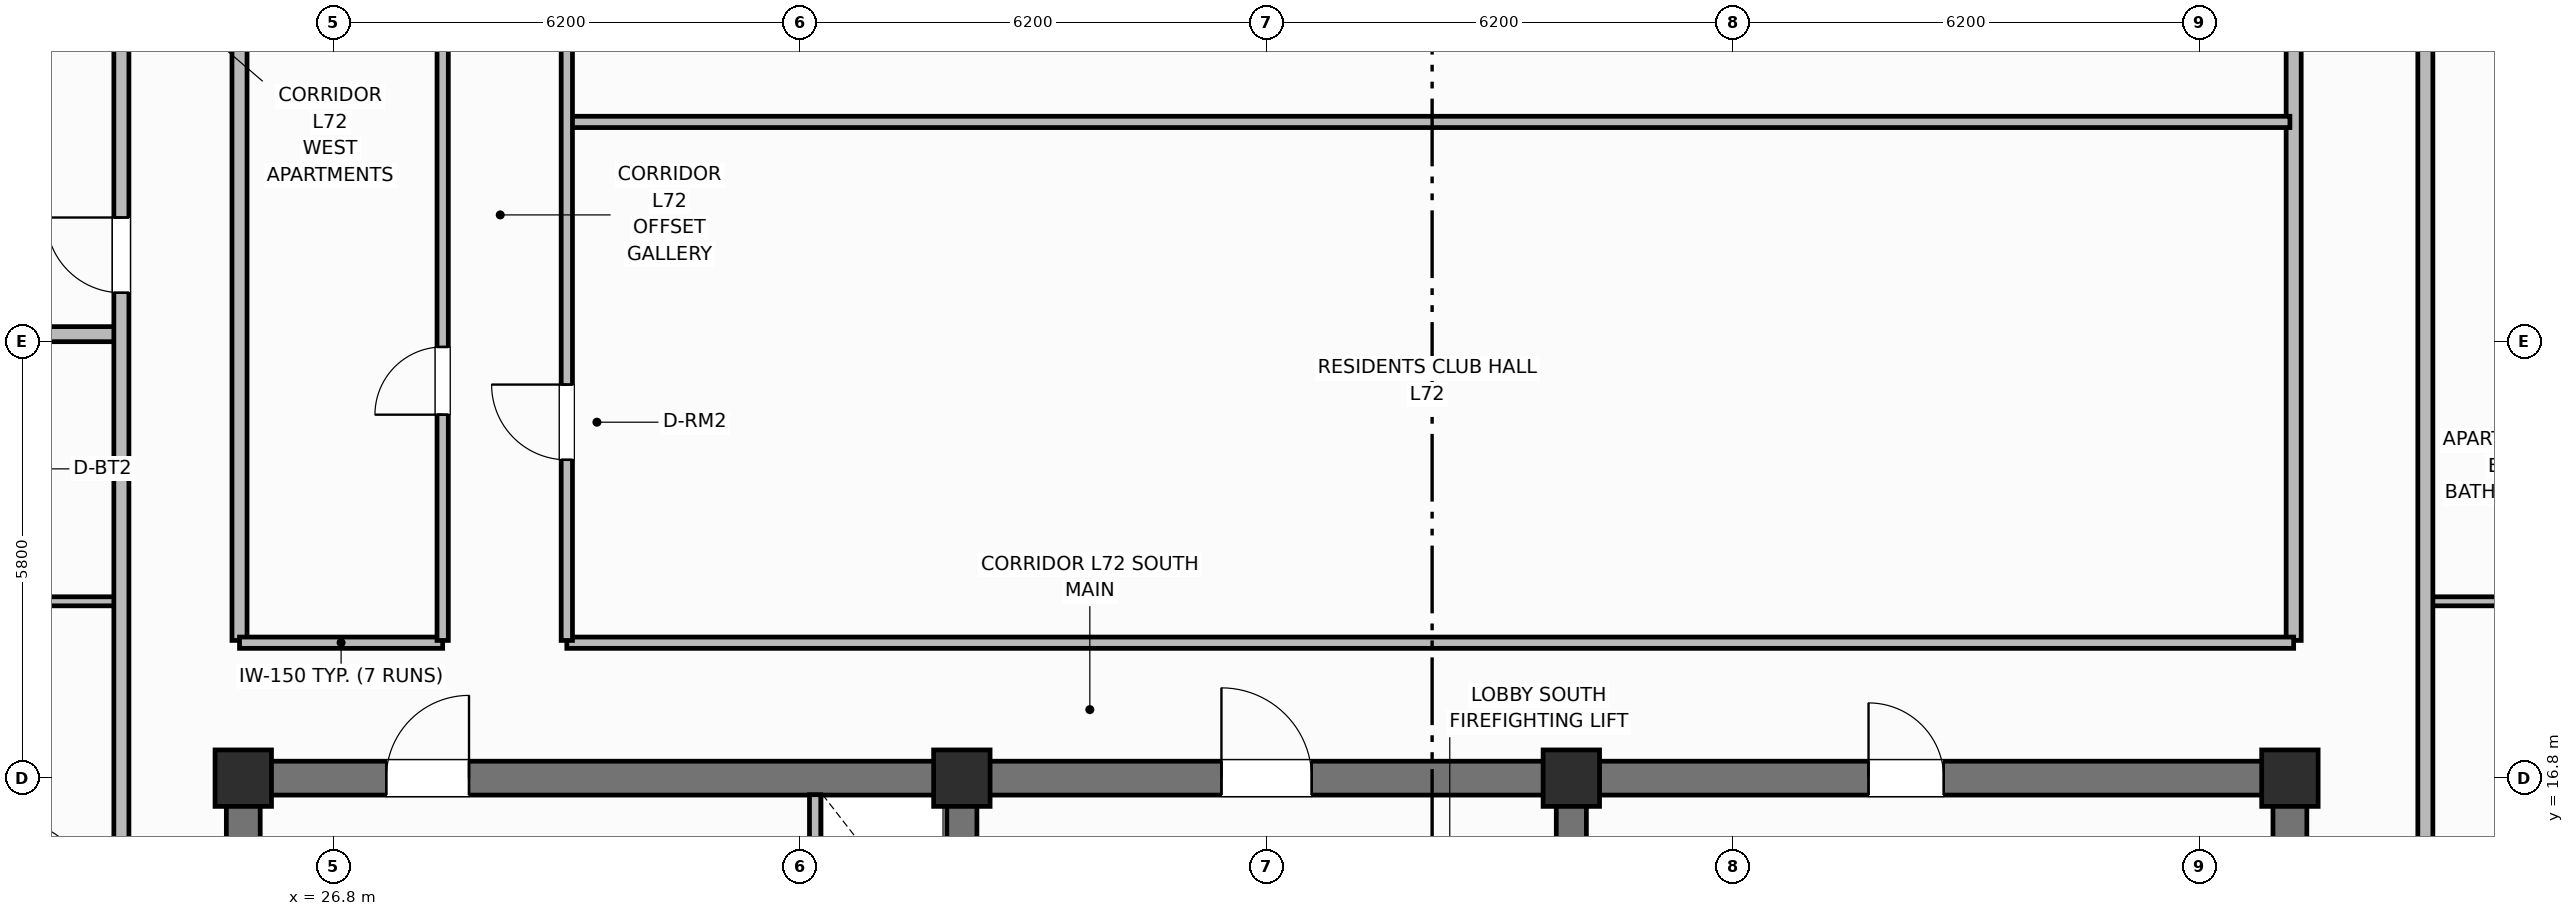
"""IFC4 building model, lengths in metres.
Left out: names, types, materials, properties, quantities, classifications, styles, units other than length and angle.
Written with IfcOpenShell. Run it as: python <this file> out.ifc"""

import sys

from ifc_helpers import new_model, si_unit, direction, frame, frame_2d, origin, origin_2d, place, context, subcontext, project, spatial, rectangle, extrude, element, fill, save


model = new_model("IFC4")
c1 = context("Model", 3, precision=1e-05, world=origin(), true_north=direction((0.0, 1.0)))
c2 = subcontext(c1, "Body", "Model", "MODEL_VIEW")
j1 = project(units=[si_unit("LENGTHUNIT", "METRE"), si_unit("PLANEANGLEUNIT", "RADIAN")], contexts=[c1])
p1 = place(None, origin())
s1 = spatial("IfcSite", under=j1, at=p1, CompositionType="ELEMENT")
p2 = place(p1, origin())
s2 = spatial("IfcBuilding", under=s1, at=p2, CompositionType="ELEMENT")
p3 = place(p2, frame((0.0, 0.0, 286.1)))
s3 = spatial("IfcBuildingStorey", under=s2, at=p3, CompositionType="ELEMENT", Elevation=286.1)
for number, where, z_axis, x_axis in (
    (1, (25.6, 10.825, 0.0), (0.0, 0.0, 1.0), (0.0, 1.0, 0.0)),
    (2, (52.8, 10.825, 0.0), (0.0, 0.0, 1.0), (0.0, 1.0, 0.0)),
):
    element("IfcWall", number, at=place(p3, frame(where, z_axis=z_axis, x_axis=x_axis)), inside=s3, PredefinedType="SHEAR", context=c2, shape_type="SweptSolid", body=[
        extrude(rectangle(XDim=5.75, YDim=0.45, at=frame_2d((2.875, 0.0))), origin(), (0.0, 0.0, 1.0), 3.7),
    ])
p4 = place(p3, frame((25.6, 16.8, 0.0), z_axis=(0.0, 0.0, 1.0), x_axis=(1.0, 0.0, 0.0)))
e3 = element("IfcWall", 3, at=p4, inside=s3, PredefinedType="SHEAR", context=c2, shape_type="SweptSolid", body=[
    extrude(rectangle(XDim=27.2, YDim=0.45, at=frame_2d((13.6, 0.0))), origin(), (0.0, 0.0, 1.0), 3.7),
])
p5 = place(p4, frame((1.9, 0.0, 0.0)))
e4 = element("IfcOpeningElement", 4, at=p5, cuts=e3, PredefinedType="OPENING", context=c2, shape_type="SweptSolid", body=[
    extrude(rectangle(XDim=1.1, YDim=2.15, at=frame_2d((0.55, 1.075))), frame((0.0, 0.235, 0.0), z_axis=(0.0, -1.0, 0.0), x_axis=(1.0, 0.0, 0.0)), (0.0, 0.0, 1.0), 0.47),
])
p6 = place(p4, frame((13.0, 0.0, 0.0)))
e5 = element("IfcOpeningElement", 5, at=p6, cuts=e3, PredefinedType="OPENING", context=c2, shape_type="SweptSolid", body=[
    extrude(rectangle(XDim=1.2, YDim=2.15, at=frame_2d((0.6, 1.075))), frame((0.0, 0.235, 0.0), z_axis=(0.0, -1.0, 0.0), x_axis=(1.0, 0.0, 0.0)), (0.0, 0.0, 1.0), 0.47),
])
p7 = place(p4, frame((21.6, 0.0, 0.0)))
e6 = element("IfcOpeningElement", 6, at=p7, cuts=e3, PredefinedType="OPENING", context=c2, shape_type="SweptSolid", body=[
    extrude(rectangle(XDim=1.0, YDim=2.15, at=frame_2d((0.5, 1.075))), frame((0.0, 0.235, 0.0), z_axis=(0.0, -1.0, 0.0), x_axis=(1.0, 0.0, 0.0)), (0.0, 0.0, 1.0), 0.47),
])
for number, where, z_axis, x_axis in (
    (7, (35.15, 10.825, 0.0), (0.0, 0.0, 1.0), (0.0, 1.0, 0.0)),
    (8, (43.25, 10.825, 0.0), (0.0, 0.0, 1.0), (0.0, 1.0, 0.0)),
):
    element("IfcWall", number, at=place(p3, frame(where, z_axis=z_axis, x_axis=x_axis)), inside=s3, PredefinedType="SHEAR", context=c2, shape_type="SweptSolid", body=[
        extrude(rectangle(XDim=5.75, YDim=0.4, at=frame_2d((2.875, 0.0))), origin(), (0.0, 0.0, 1.0), 3.7),
    ])
for number, where, z_axis, x_axis in (
    (9, (25.6, 16.8, 0.0), (0.0, 0.0, 1.0), (1.0, 0.0, 0.0)),
    (10, (35.15, 16.8, 0.0), (0.0, 0.0, 1.0), (1.0, 0.0, 0.0)),
    (11, (43.25, 16.8, 0.0), (0.0, 0.0, 1.0), (1.0, 0.0, 0.0)),
    (12, (52.8, 16.8, 0.0), (0.0, 0.0, 1.0), (1.0, 0.0, 0.0)),
):
    element("IfcColumn", number, at=place(p3, frame(where, z_axis=z_axis, x_axis=x_axis)), inside=s3, PredefinedType="COLUMN", context=c2, shape_type="SweptSolid", body=[
        extrude(rectangle(XDim=0.75, YDim=0.75, at=origin_2d()), origin(), (0.0, 0.0, 1.0), 3.7),
    ])
p8 = place(p3, frame((33.2, 14.5, 0.0), z_axis=(0.0, 0.0, 1.0), x_axis=(0.0, 1.0, 0.0)))
e13 = element("IfcWall", 13, at=p8, inside=s3, PredefinedType="PARTITIONING", context=c2, shape_type="SweptSolid", body=[
    extrude(rectangle(XDim=2.08, YDim=0.15, at=frame_2d((1.04, 0.0))), origin(), (0.0, 0.0, 1.0), 2.56),
])
p9 = place(p8, frame((0.55, 0.0, 0.0)))
e14 = element("IfcOpeningElement", 14, at=p9, cuts=e13, PredefinedType="OPENING", context=c2, shape_type="SweptSolid", body=[
    extrude(rectangle(XDim=0.85, YDim=2.05, at=frame_2d((0.425, 1.025))), frame((0.0, 0.085, 0.0), z_axis=(0.0, -1.0, 0.0), x_axis=(1.0, 0.0, 0.0)), (0.0, 0.0, 1.0), 0.17),
])
for number, where, z_axis, x_axis in (
    (15, (25.55, 18.63, 0.0), (0.0, 0.0, 1.0), (0.0, 1.0, 0.0)),
    (16, (52.85, 18.63, 0.0), (0.0, 0.0, 1.0), (0.0, 1.0, 0.0)),
):
    element("IfcWall", number, at=place(p3, frame(where, z_axis=z_axis, x_axis=x_axis)), inside=s3, PredefinedType="PARTITIONING", context=c2, shape_type="SweptSolid", body=[
        extrude(rectangle(XDim=19.14, YDim=0.2, at=frame_2d((9.57, 0.0))), origin(), (0.0, 0.0, 1.0), 2.56),
    ])
p10 = place(p3, frame((25.55, 18.6, 0.0), z_axis=(0.0, 0.0, 1.0), x_axis=(1.0, 0.0, 0.0)))
e17 = element("IfcWall", 17, at=p10, inside=s3, PredefinedType="PARTITIONING", context=c2, shape_type="SweptSolid", body=[
    extrude(rectangle(XDim=2.7, YDim=0.15, at=frame_2d((1.35, 0.0))), origin(), (0.0, 0.0, 1.0), 2.56),
])
p11 = place(p3, frame((29.9, 18.6, 0.0), z_axis=(0.0, 0.0, 1.0), x_axis=(1.0, 0.0, 0.0)))
e18 = element("IfcWall", 18, at=p11, inside=s3, PredefinedType="PARTITIONING", context=c2, shape_type="SweptSolid", body=[
    extrude(rectangle(XDim=22.95, YDim=0.15, at=frame_2d((11.475, 0.0))), origin(), (0.0, 0.0, 1.0), 2.56),
])
p12 = place(p3, frame((29.93, 25.521, 0.0), z_axis=(0.0, 0.0, 1.0), x_axis=(1.0, 0.0, 0.0)))
e19 = element("IfcWall", 19, at=p12, inside=s3, PredefinedType="PARTITIONING", context=c2, shape_type="SweptSolid", body=[
    extrude(rectangle(XDim=22.87, YDim=0.15, at=frame_2d((11.435, 0.0))), origin(), (0.0, 0.0, 1.0), 2.56),
])
p13 = place(p3, frame((28.25, 18.63, 0.0), z_axis=(0.0, 0.0, 1.0), x_axis=(0.0, 1.0, 0.0)))
e20 = element("IfcWall", 20, at=p13, inside=s3, PredefinedType="PARTITIONING", context=c2, shape_type="SweptSolid", body=[
    extrude(rectangle(XDim=19.14, YDim=0.15, at=frame_2d((9.57, 0.0))), origin(), (0.0, 0.0, 1.0), 2.56),
])
p14 = place(p13, frame((3.0, 0.0, 0.0)))
e21 = element("IfcOpeningElement", 21, at=p14, cuts=e20, PredefinedType="OPENING", context=c2, shape_type="SweptSolid", body=[
    extrude(rectangle(XDim=0.9, YDim=2.1, at=frame_2d((0.45, 1.05))), frame((0.0, 0.085, 0.0), z_axis=(0.0, -1.0, 0.0), x_axis=(1.0, 0.0, 0.0)), (0.0, 0.0, 1.0), 0.17),
])
p15 = place(p13, frame((11.5, 0.0, 0.0)))
e22 = element("IfcOpeningElement", 22, at=p15, cuts=e20, PredefinedType="OPENING", context=c2, shape_type="SweptSolid", body=[
    extrude(rectangle(XDim=0.9, YDim=2.1, at=frame_2d((0.45, 1.05))), frame((0.0, 0.085, 0.0), z_axis=(0.0, -1.0, 0.0), x_axis=(1.0, 0.0, 0.0)), (0.0, 0.0, 1.0), 0.17),
])
p16 = place(p3, frame((29.9, 18.63, 0.0), z_axis=(0.0, 0.0, 1.0), x_axis=(0.0, 1.0, 0.0)))
e23 = element("IfcWall", 23, at=p16, inside=s3, PredefinedType="PARTITIONING", context=c2, shape_type="SweptSolid", body=[
    extrude(rectangle(XDim=19.14, YDim=0.15, at=frame_2d((9.57, 0.0))), origin(), (0.0, 0.0, 1.0), 2.56),
])
p17 = place(p16, frame((2.4, 0.0, 0.0)))
e24 = element("IfcOpeningElement", 24, at=p17, cuts=e23, PredefinedType="OPENING", context=c2, shape_type="SweptSolid", body=[
    extrude(rectangle(XDim=1.0, YDim=2.15, at=frame_2d((0.5, 1.075))), frame((0.0, 0.085, 0.0), z_axis=(0.0, -1.0, 0.0), x_axis=(1.0, 0.0, 0.0)), (0.0, 0.0, 1.0), 0.17),
])
p18 = place(p16, frame((8.89, 0.0, 0.0)))
e25 = element("IfcOpeningElement", 25, at=p18, cuts=e23, PredefinedType="OPENING", context=c2, shape_type="SweptSolid", body=[
    extrude(rectangle(XDim=1.0, YDim=2.15, at=frame_2d((0.5, 1.075))), frame((0.0, 0.085, 0.0), z_axis=(0.0, -1.0, 0.0), x_axis=(1.0, 0.0, 0.0)), (0.0, 0.0, 1.0), 0.17),
])
p19 = place(p3, frame((22.03, 19.15, 0.0), z_axis=(0.0, 0.0, 1.0), x_axis=(1.0, 0.0, 0.0)))
e26 = element("IfcWall", 26, at=p19, inside=s3, PredefinedType="PARTITIONING", context=c2, shape_type="SweptSolid", body=[
    extrude(rectangle(XDim=1.95, YDim=0.12, at=frame_2d((0.975, 0.0))), origin(), (0.0, 0.0, 1.0), 2.56),
])
p20 = place(p3, frame((19.53, 22.7, 0.0), z_axis=(0.0, 0.0, 1.0), x_axis=(1.0, 0.0, 0.0)))
e27 = element("IfcWall", 27, at=p20, inside=s3, PredefinedType="PARTITIONING", context=c2, shape_type="SweptSolid", body=[
    extrude(rectangle(XDim=4.45, YDim=0.2, at=frame_2d((2.225, 0.0))), origin(), (0.0, 0.0, 1.0), 2.56),
])
p21 = place(p3, frame((23.98, 9.95, 0.0), z_axis=(0.0, 0.0, 1.0), x_axis=(0.0, 1.0, 0.0)))
e28 = element("IfcWall", 28, at=p21, inside=s3, PredefinedType="PARTITIONING", context=c2, shape_type="SweptSolid", body=[
    extrude(rectangle(XDim=36.5, YDim=0.2, at=frame_2d((18.25, 0.0))), origin(), (0.0, 0.0, 1.0), 2.56),
])
p22 = place(p21, frame((3.25, 0.0, 0.0)))
e29 = element("IfcOpeningElement", 29, at=p22, cuts=e28, PredefinedType="OPENING", context=c2, shape_type="SweptSolid", body=[
    extrude(rectangle(XDim=1.0, YDim=2.15, at=frame_2d((0.5, 1.075))), frame((0.0, 0.11, 0.0), z_axis=(0.0, -1.0, 0.0), x_axis=(1.0, 0.0, 0.0)), (0.0, 0.0, 1.0), 0.22),
])
p23 = place(p21, frame((13.3, 0.0, 0.0)))
e30 = element("IfcOpeningElement", 30, at=p23, cuts=e28, PredefinedType="OPENING", context=c2, shape_type="SweptSolid", body=[
    extrude(rectangle(XDim=1.0, YDim=2.15, at=frame_2d((0.5, 1.075))), frame((0.0, 0.11, 0.0), z_axis=(0.0, -1.0, 0.0), x_axis=(1.0, 0.0, 0.0)), (0.0, 0.0, 1.0), 0.22),
])
p24 = place(p21, frame((25.005, 0.0, 0.0)))
e31 = element("IfcOpeningElement", 31, at=p24, cuts=e28, PredefinedType="OPENING", context=c2, shape_type="SweptSolid", body=[
    extrude(rectangle(XDim=1.0, YDim=2.15, at=frame_2d((0.5, 1.075))), frame((0.0, 0.11, 0.0), z_axis=(0.0, -1.0, 0.0), x_axis=(1.0, 0.0, 0.0)), (0.0, 0.0, 1.0), 0.22),
])
p25 = place(p3, frame((54.6, 19.15, 0.0), z_axis=(0.0, 0.0, 1.0), x_axis=(1.0, 0.0, 0.0)))
e32 = element("IfcWall", 32, at=p25, inside=s3, PredefinedType="PARTITIONING", context=c2, shape_type="SweptSolid", body=[
    extrude(rectangle(XDim=1.95, YDim=0.12, at=frame_2d((0.975, 0.0))), origin(), (0.0, 0.0, 1.0), 2.56),
])
p26 = place(p3, frame((54.6, 9.95, 0.0), z_axis=(0.0, 0.0, 1.0), x_axis=(0.0, 1.0, 0.0)))
e33 = element("IfcWall", 33, at=p26, inside=s3, PredefinedType="PARTITIONING", context=c2, shape_type="SweptSolid", body=[
    extrude(rectangle(XDim=36.5, YDim=0.2, at=frame_2d((18.25, 0.0))), origin(), (0.0, 0.0, 1.0), 2.56),
])
p27 = place(p26, frame((3.25, 0.0, 0.0)))
e34 = element("IfcOpeningElement", 34, at=p27, cuts=e33, PredefinedType="OPENING", context=c2, shape_type="SweptSolid", body=[
    extrude(rectangle(XDim=1.0, YDim=2.15, at=frame_2d((0.5, 1.075))), frame((0.0, 0.11, 0.0), z_axis=(0.0, -1.0, 0.0), x_axis=(1.0, 0.0, 0.0)), (0.0, 0.0, 1.0), 0.22),
])
p28 = place(p26, frame((23.5, 0.0, 0.0)))
e35 = element("IfcOpeningElement", 35, at=p28, cuts=e33, PredefinedType="OPENING", context=c2, shape_type="SweptSolid", body=[
    extrude(rectangle(XDim=1.0, YDim=2.15, at=frame_2d((0.5, 1.075))), frame((0.0, 0.11, 0.0), z_axis=(0.0, -1.0, 0.0), x_axis=(1.0, 0.0, 0.0)), (0.0, 0.0, 1.0), 0.22),
])
p29 = place(p14, origin())
e36 = element("IfcDoor", 36, at=p29, inside=s3, OperationType="SINGLE_SWING_LEFT", PredefinedType="DOOR", context=c2, shape_type="SweptSolid", body=[
    extrude(rectangle(XDim=0.9, YDim=2.1, at=frame_2d((0.45, 1.05))), frame((0.0, 0.025, 0.0), z_axis=(0.0, -1.0, 0.0), x_axis=(1.0, 0.0, 0.0)), (0.0, 0.0, 1.0), 0.05),
])
fill(e21, e36)
p30 = place(p17, origin())
e37 = element("IfcDoor", 37, at=p30, inside=s3, OperationType="SINGLE_SWING_RIGHT", PredefinedType="DOOR", context=c2, shape_type="SweptSolid", body=[
    extrude(rectangle(XDim=1.0, YDim=2.15, at=frame_2d((0.5, 1.075))), frame((0.0, 0.025, 0.0), z_axis=(0.0, -1.0, 0.0), x_axis=(1.0, 0.0, 0.0)), (0.0, 0.0, 1.0), 0.05),
])
fill(e24, e37)
p31 = place(p23, origin())
e38 = element("IfcDoor", 38, at=p31, inside=s3, OperationType="SINGLE_SWING_RIGHT", PredefinedType="DOOR", context=c2, shape_type="SweptSolid", body=[
    extrude(rectangle(XDim=1.0, YDim=2.15, at=frame_2d((0.5, 1.075))), frame((0.0, 0.025, 0.0), z_axis=(0.0, -1.0, 0.0), x_axis=(1.0, 0.0, 0.0)), (0.0, 0.0, 1.0), 0.05),
])
fill(e30, e38)
p32 = place(p5, origin())
e39 = element("IfcDoor", 39, at=p32, inside=s3, OperationType="SINGLE_SWING_RIGHT", PredefinedType="DOOR", context=c2, shape_type="SweptSolid", body=[
    extrude(rectangle(XDim=1.1, YDim=2.15, at=frame_2d((0.55, 1.075))), frame((0.0, 0.025, 0.0), z_axis=(0.0, -1.0, 0.0), x_axis=(1.0, 0.0, 0.0)), (0.0, 0.0, 1.0), 0.05),
])
fill(e4, e39)
p33 = place(p6, origin())
e40 = element("IfcDoor", 40, at=p33, inside=s3, OperationType="SINGLE_SWING_LEFT", PredefinedType="DOOR", context=c2, shape_type="SweptSolid", body=[
    extrude(rectangle(XDim=1.2, YDim=2.15, at=frame_2d((0.6, 1.075))), frame((0.0, 0.025, 0.0), z_axis=(0.0, -1.0, 0.0), x_axis=(1.0, 0.0, 0.0)), (0.0, 0.0, 1.0), 0.05),
])
fill(e5, e40)
p34 = place(p7, origin())
e41 = element("IfcDoor", 41, at=p34, inside=s3, OperationType="SINGLE_SWING_LEFT", PredefinedType="DOOR", context=c2, shape_type="SweptSolid", body=[
    extrude(rectangle(XDim=1.0, YDim=2.15, at=frame_2d((0.5, 1.075))), frame((0.0, 0.025, 0.0), z_axis=(0.0, -1.0, 0.0), x_axis=(1.0, 0.0, 0.0)), (0.0, 0.0, 1.0), 0.05),
])
fill(e6, e41)
save(model, sys.argv[1])
